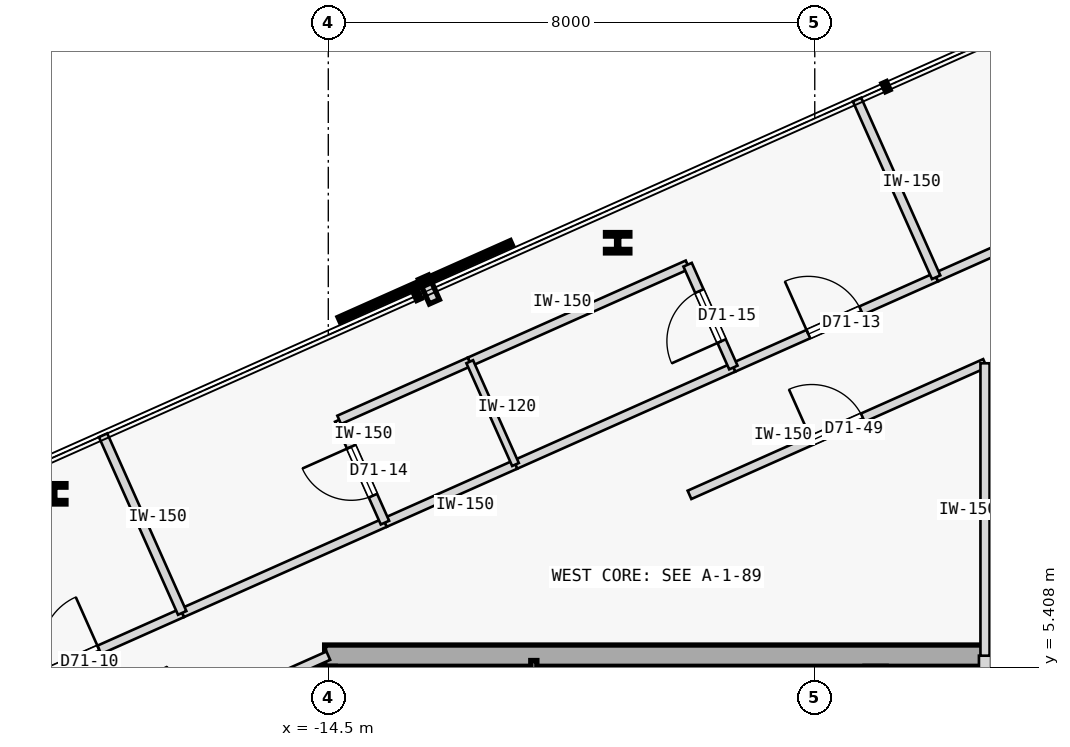
"""IFC4 building model, lengths in metres.
Left out: names, types, materials, properties, quantities, classifications, styles, units other than length and angle.
Written with IfcOpenShell. Run it as: python <this file> out.ifc"""

import sys

from ifc_helpers import new_model, si_unit, direction, frame, frame_2d, origin, origin_2d, place, context, subcontext, project, spatial, rectangle, hollow_rectangle, i_section, extrude, element, fill, save


model = new_model("IFC4")
c1 = context("Model", 3, precision=1e-05, world=origin(), true_north=direction((0.0, 1.0)))
c2 = subcontext(c1, "Body", "Model", "MODEL_VIEW")
j1 = project(units=[si_unit("LENGTHUNIT", "METRE"), si_unit("PLANEANGLEUNIT", "RADIAN")], contexts=[c1])
p1 = place(None, origin())
s1 = spatial("IfcSite", under=j1, at=p1, CompositionType="ELEMENT")
p2 = place(p1, origin())
s2 = spatial("IfcBuilding", under=s1, at=p2, CompositionType="ELEMENT")
p3 = place(p2, frame((0.0, 0.0, 265.55)))
s3 = spatial("IfcBuildingStorey", under=s2, at=p3, CompositionType="ELEMENT", Elevation=265.55)
p4 = place(p3, frame((-14.56, 5.6, 0.0), z_axis=(0.0, 0.0, 1.0), x_axis=(1.0, 0.0, 0.0)))
e1 = element("IfcWall", 1, at=p4, inside=s3, PredefinedType="SHEAR", context=c2, shape_type="SweptSolid", body=[
    extrude(rectangle(XDim=11.41, YDim=0.35, at=frame_2d((5.705, 0.0))), origin(), (0.0, 0.0, 1.0), 3.125),
])
p5 = place(p3, frame((-14.56, -5.425, 0.0), z_axis=(0.0, 0.0, 1.0), x_axis=(0.0, 1.0, 0.0)))
e2 = element("IfcWall", 2, at=p5, inside=s3, PredefinedType="SHEAR", context=c2, shape_type="SweptSolid", body=[
    extrude(rectangle(XDim=10.85, YDim=0.35, at=frame_2d((5.425, 0.0))), origin(), (0.0, 0.0, 1.0), 3.125),
])
p6 = place(p3, frame((-5.5, 2.15, 0.0), z_axis=(0.0, 0.0, 1.0), x_axis=(0.0, 1.0, 0.0)))
e3 = element("IfcWall", 3, at=p6, inside=s3, PredefinedType="SHEAR", context=c2, shape_type="SweptSolid", body=[
    extrude(rectangle(XDim=3.275, YDim=0.35, at=frame_2d((1.638, 0.0))), origin(), (0.0, 0.0, 1.0), 3.125),
])
p7 = place(p3, frame((-11.12, 5.42, 0.0), z_axis=(0.0, 0.0, 1.0), x_axis=(1.0, 0.0, 0.0)))
e4 = element("IfcColumn", 4, at=p7, inside=s3, PredefinedType="COLUMN", context=c2, shape_type="SweptSolid", body=[
    extrude(hollow_rectangle(XDim=0.1, YDim=0.2, WallThickness=0.008, at=origin_2d()), origin(), (0.0, 0.0, 1.0), 3.35),
])
for number, where, z_axis, x_axis in (
    (5, (-9.741, 12.39, 0.0), (0.0, 0.0, 1.0), (1.0, 0.0, 0.0)),
    (6, (-19.015, 8.262, 0.0), (0.0, 0.0, 1.0), (1.0, 0.0, 0.0)),
):
    element("IfcColumn", number, at=place(p3, frame(where, z_axis=z_axis, x_axis=x_axis)), inside=s3, PredefinedType="COLUMN", context=c2, shape_type="SweptSolid", body=[
        extrude(i_section(OverallWidth=0.401, OverallDepth=0.335, WebThickness=0.036, FlangeThickness=0.058, FilletRadius=0.015, at=origin_2d()), origin(), (0.0, 0.0, 1.0), 3.35),
    ])
p8 = place(p3, frame((-3.7, -1.15, 0.0), z_axis=(0.0, 0.0, 1.0), x_axis=(0.0, 1.0, 0.0)))
e7 = element("IfcWall", 7, at=p8, inside=s3, PredefinedType="STANDARD", context=c2, shape_type="SweptSolid", body=[
    extrude(rectangle(XDim=6.75, YDim=0.2, at=frame_2d((3.375, 0.0))), origin(), (0.0, 0.0, 1.0), 3.125),
])
p9 = place(p8, frame((1.1, 0.0, 0.0)))
e8 = element("IfcOpeningElement", 8, at=p9, cuts=e7, PredefinedType="OPENING", context=c2, shape_type="SweptSolid", body=[
    extrude(rectangle(XDim=0.9, YDim=2.15, at=frame_2d((0.45, 1.075))), frame((0.0, 0.11, 0.0), z_axis=(0.0, -1.0, 0.0), x_axis=(1.0, 0.0, 0.0)), (0.0, 0.0, 1.0), 0.22),
])
p10 = place(p8, frame((4.0, 0.0, 0.0)))
e9 = element("IfcOpeningElement", 9, at=p10, cuts=e7, PredefinedType="OPENING", context=c2, shape_type="SweptSolid", body=[
    extrude(rectangle(XDim=0.92, YDim=2.15, at=frame_2d((0.46, 1.075))), frame((0.0, 0.11, 0.0), z_axis=(0.0, -1.0, 0.0), x_axis=(1.0, 0.0, 0.0)), (0.0, 0.0, 1.0), 0.22),
])
p11 = place(p3, frame((-20.499, 4.702, 0.0), z_axis=(0.0, 0.0, 1.0), x_axis=(0.913553019012, 0.406719659537, 0.0)))
e10 = element("IfcWall", 10, at=p11, inside=s3, PredefinedType="PARTITIONING", context=c2, shape_type="SweptSolid", body=[
    extrude(rectangle(XDim=3.936, YDim=0.15, at=frame_2d((1.968, 0.0))), origin(), (0.0, 0.0, 1.0), 3.125),
])
p12 = place(p11, frame((1.493, 0.0, 0.0)))
e11 = element("IfcOpeningElement", 11, at=p12, cuts=e10, PredefinedType="OPENING", context=c2, shape_type="SweptSolid", body=[
    extrude(rectangle(XDim=0.95, YDim=2.15, at=frame_2d((0.475, 1.075))), frame((0.0, 0.085, 0.0), z_axis=(0.0, -1.0, 0.0), x_axis=(1.0, 0.0, 0.0)), (0.0, 0.0, 1.0), 0.17),
])
p13 = place(p3, frame((-16.903, 6.303, 0.0), z_axis=(0.0, 0.0, 1.0), x_axis=(0.913543802, 0.40674036169, 0.0)))
e12 = element("IfcWall", 12, at=p13, inside=s3, PredefinedType="PARTITIONING", context=c2, shape_type="SweptSolid", body=[
    extrude(rectangle(XDim=3.65, YDim=0.15, at=frame_2d((1.825, 0.0))), origin(), (0.0, 0.0, 1.0), 3.125),
])
p14 = place(p3, frame((-7.839, 10.339, 0.0), z_axis=(0.0, 0.0, 1.0), x_axis=(0.913543802, 0.40674036169, 0.0)))
e13 = element("IfcWall", 13, at=p14, inside=s3, PredefinedType="PARTITIONING", context=c2, shape_type="SweptSolid", body=[
    extrude(rectangle(XDim=3.65, YDim=0.15, at=frame_2d((1.825, 0.0))), origin(), (0.0, 0.0, 1.0), 3.125),
])
p15 = place(p14, frame((1.35, 0.0, 0.0)))
e14 = element("IfcOpeningElement", 14, at=p15, cuts=e13, PredefinedType="OPENING", context=c2, shape_type="SweptSolid", body=[
    extrude(rectangle(XDim=0.95, YDim=2.15, at=frame_2d((0.475, 1.075))), frame((0.0, 0.085, 0.0), z_axis=(0.0, -1.0, 0.0), x_axis=(1.0, 0.0, 0.0)), (0.0, 0.0, 1.0), 0.17),
])
p16 = place(p3, frame((-13.568, 7.788, 0.0), z_axis=(0.0, 0.0, 1.0), x_axis=(0.913558622212, 0.406707073682, 0.0)))
e15 = element("IfcWall", 15, at=p16, inside=s3, PredefinedType="PARTITIONING", context=c2, shape_type="SweptSolid", body=[
    extrude(rectangle(XDim=2.35, YDim=0.15, at=frame_2d((1.175, 0.0))), origin(), (0.0, 0.0, 1.0), 3.125),
])
p17 = place(p3, frame((-11.421, 8.744, 0.0), z_axis=(0.0, 0.0, 1.0), x_axis=(0.913539234326, 0.406750620585, 0.0)))
e16 = element("IfcWall", 16, at=p17, inside=s3, PredefinedType="PARTITIONING", context=c2, shape_type="SweptSolid", body=[
    extrude(rectangle(XDim=3.922, YDim=0.15, at=frame_2d((1.961, 0.0))), origin(), (0.0, 0.0, 1.0), 3.125),
])
p18 = place(p3, frame((-4.504, 11.823, 0.0), z_axis=(0.0, 0.0, 1.0), x_axis=(0.913543802, 0.40674036169, 0.0)))
e17 = element("IfcWall", 17, at=p18, inside=s3, PredefinedType="PARTITIONING", context=c2, shape_type="SweptSolid", body=[
    extrude(rectangle(XDim=3.65, YDim=0.15, at=frame_2d((1.825, 0.0))), origin(), (0.0, 0.0, 1.0), 3.125),
])
p19 = place(p18, frame((1.35, 0.0, 0.0)))
e18 = element("IfcOpeningElement", 18, at=p19, cuts=e17, PredefinedType="OPENING", context=c2, shape_type="SweptSolid", body=[
    extrude(rectangle(XDim=0.95, YDim=2.15, at=frame_2d((0.475, 1.075))), frame((0.0, 0.085, 0.0), z_axis=(0.0, -1.0, 0.0), x_axis=(1.0, 0.0, 0.0)), (0.0, 0.0, 1.0), 0.17),
])
p20 = place(p3, frame((-18.661, 3.747, 0.0), z_axis=(0.0, 0.0, 1.0), x_axis=(0.913535055583, 0.40676000568, 0.0)))
e19 = element("IfcWall", 19, at=p20, inside=s3, PredefinedType="PARTITIONING", context=c2, shape_type="SweptSolid", body=[
    extrude(rectangle(XDim=4.555, YDim=0.15, at=frame_2d((2.277, 0.0))), origin(), (0.0, 0.0, 1.0), 3.125),
])
p21 = place(p20, frame((1.134, 0.0, 0.0)))
e20 = element("IfcOpeningElement", 20, at=p21, cuts=e19, PredefinedType="OPENING", context=c2, shape_type="SweptSolid", body=[
    extrude(rectangle(XDim=0.92, YDim=2.15, at=frame_2d((0.46, 1.075))), frame((0.0, 0.085, 0.0), z_axis=(0.0, -1.0, 0.0), x_axis=(1.0, 0.0, 0.0)), (0.0, 0.0, 1.0), 0.17),
])
p22 = place(p3, frame((-8.56, 8.244, 0.0), z_axis=(0.0, 0.0, 1.0), x_axis=(0.91354831274, 0.406730230362, 0.0)))
e21 = element("IfcWall", 21, at=p22, inside=s3, PredefinedType="PARTITIONING", context=c2, shape_type="SweptSolid", body=[
    extrude(rectangle(XDim=5.32, YDim=0.15, at=frame_2d((2.66, 0.0))), origin(), (0.0, 0.0, 1.0), 3.125),
])
p23 = place(p22, frame((2.2, 0.0, 0.0)))
e22 = element("IfcOpeningElement", 22, at=p23, cuts=e21, PredefinedType="OPENING", context=c2, shape_type="SweptSolid", body=[
    extrude(rectangle(XDim=0.92, YDim=2.15, at=frame_2d((0.46, 1.075))), frame((0.0, 0.085, 0.0), z_axis=(0.0, -1.0, 0.0), x_axis=(1.0, 0.0, 0.0)), (0.0, 0.0, 1.0), 0.17),
])
p24 = place(p3, frame((-3.7, 5.6, 0.0), z_axis=(0.0, 0.0, 1.0), x_axis=(5.077173e-05, 0.999999998711, 0.0)))
e23 = element("IfcWall", 23, at=p24, inside=s3, PredefinedType="PARTITIONING", context=c2, shape_type="SweptSolid", body=[
    extrude(rectangle(XDim=4.809, YDim=0.15, at=frame_2d((2.404, 0.0))), origin(), (0.0, 0.0, 1.0), 3.125),
])
p25 = place(p3, frame((-16.903, 6.303, 0.0), z_axis=(0.0, 0.0, 1.0), x_axis=(-0.406733350739, 0.913546923478, 0.0)))
e24 = element("IfcWall", 24, at=p25, inside=s3, PredefinedType="PARTITIONING", context=c2, shape_type="SweptSolid", body=[
    extrude(rectangle(XDim=3.198, YDim=0.15, at=frame_2d((1.599, 0.0))), origin(), (0.0, 0.0, 1.0), 3.125),
])
p26 = place(p3, frame((-13.568, 7.788, 0.0), z_axis=(0.0, 0.0, 1.0), x_axis=(-0.406750635596, 0.913539227643, 0.0)))
e25 = element("IfcWall", 25, at=p26, inside=s3, PredefinedType="PARTITIONING", context=c2, shape_type="SweptSolid", body=[
    extrude(rectangle(XDim=1.85, YDim=0.15, at=frame_2d((0.925, 0.0))), origin(), (0.0, 0.0, 1.0), 3.125),
])
p27 = place(p26, frame((0.485, 0.0, 0.0)))
e26 = element("IfcOpeningElement", 26, at=p27, cuts=e25, PredefinedType="OPENING", context=c2, shape_type="SweptSolid", body=[
    extrude(rectangle(XDim=0.88, YDim=2.15, at=frame_2d((0.44, 1.075))), frame((0.0, 0.085, 0.0), z_axis=(0.0, -1.0, 0.0), x_axis=(1.0, 0.0, 0.0)), (0.0, 0.0, 1.0), 0.17),
])
p28 = place(p3, frame((-14.321, 9.478, 0.0), z_axis=(0.0, 0.0, 1.0), x_axis=(0.913502828817, 0.406832375486, 0.0)))
e27 = element("IfcWall", 27, at=p28, inside=s3, PredefinedType="PARTITIONING", context=c2, shape_type="SweptSolid", body=[
    extrude(rectangle(XDim=2.35, YDim=0.15, at=frame_2d((1.175, 0.0))), origin(), (0.0, 0.0, 1.0), 3.125),
])
p29 = place(p3, frame((-12.174, 10.434, 0.0), z_axis=(0.0, 0.0, 1.0), x_axis=(0.913549532696, 0.406727490232, 0.0)))
e28 = element("IfcWall", 28, at=p29, inside=s3, PredefinedType="PARTITIONING", context=c2, shape_type="SweptSolid", body=[
    extrude(rectangle(XDim=3.922, YDim=0.15, at=frame_2d((1.961, 0.0))), origin(), (0.0, 0.0, 1.0), 3.125),
])
p30 = place(p3, frame((-7.839, 10.339, 0.0), z_axis=(0.0, 0.0, 1.0), x_axis=(-0.406701600856, 0.913561058639, 0.0)))
e29 = element("IfcWall", 29, at=p30, inside=s3, PredefinedType="PARTITIONING", context=c2, shape_type="SweptSolid", body=[
    extrude(rectangle(XDim=1.85, YDim=0.15, at=frame_2d((0.925, 0.0))), origin(), (0.0, 0.0, 1.0), 3.125),
])
p31 = place(p30, frame((0.475, 0.0, 0.0)))
e30 = element("IfcOpeningElement", 30, at=p31, cuts=e29, PredefinedType="OPENING", context=c2, shape_type="SweptSolid", body=[
    extrude(rectangle(XDim=0.9, YDim=2.15, at=frame_2d((0.45, 1.075))), frame((0.0, 0.085, 0.0), z_axis=(0.0, -1.0, 0.0), x_axis=(1.0, 0.0, 0.0)), (0.0, 0.0, 1.0), 0.17),
])
p32 = place(p3, frame((-4.504, 11.823, 0.0), z_axis=(0.0, 0.0, 1.0), x_axis=(-0.406733350739, 0.913546923478, 0.0)))
e31 = element("IfcWall", 31, at=p32, inside=s3, PredefinedType="PARTITIONING", context=c2, shape_type="SweptSolid", body=[
    extrude(rectangle(XDim=3.198, YDim=0.15, at=frame_2d((1.599, 0.0))), origin(), (0.0, 0.0, 1.0), 3.125),
])
p33 = place(p3, frame((-11.421, 8.744, 0.0), z_axis=(0.0, 0.0, 1.0), x_axis=(-0.406811725227, 0.913512025218, 0.0)))
e32 = element("IfcWall", 32, at=p33, inside=s3, PredefinedType="PARTITIONING", context=c2, shape_type="SweptSolid", body=[
    extrude(rectangle(XDim=1.85, YDim=0.12, at=frame_2d((0.925, 0.0))), origin(), (0.0, 0.0, 1.0), 3.125),
])
p34 = place(p12, origin())
e33 = element("IfcDoor", 33, at=p34, inside=s3, OperationType="SINGLE_SWING_RIGHT", PredefinedType="DOOR", context=c2, shape_type="SweptSolid", body=[
    extrude(rectangle(XDim=0.95, YDim=2.15, at=frame_2d((0.475, 1.075))), frame((0.0, 0.025, 0.0), z_axis=(0.0, -1.0, 0.0), x_axis=(1.0, 0.0, 0.0)), (0.0, 0.0, 1.0), 0.05),
])
fill(e11, e33)
p35 = place(p15, origin())
e34 = element("IfcDoor", 34, at=p35, inside=s3, OperationType="SINGLE_SWING_LEFT", PredefinedType="DOOR", context=c2, shape_type="SweptSolid", body=[
    extrude(rectangle(XDim=0.95, YDim=2.15, at=frame_2d((0.475, 1.075))), frame((0.0, 0.025, 0.0), z_axis=(0.0, -1.0, 0.0), x_axis=(1.0, 0.0, 0.0)), (0.0, 0.0, 1.0), 0.05),
])
fill(e14, e34)
p36 = place(p27, origin())
e35 = element("IfcDoor", 35, at=p36, inside=s3, OperationType="SINGLE_SWING_RIGHT", PredefinedType="DOOR", context=c2, shape_type="SweptSolid", body=[
    extrude(rectangle(XDim=0.88, YDim=2.15, at=frame_2d((0.44, 1.075))), frame((0.0, 0.025, 0.0), z_axis=(0.0, -1.0, 0.0), x_axis=(1.0, 0.0, 0.0)), (0.0, 0.0, 1.0), 0.05),
])
fill(e26, e35)
p37 = place(p31, origin())
e36 = element("IfcDoor", 36, at=p37, inside=s3, OperationType="SINGLE_SWING_LEFT", PredefinedType="DOOR", context=c2, shape_type="SweptSolid", body=[
    extrude(rectangle(XDim=0.9, YDim=2.15, at=frame_2d((0.45, 1.075))), frame((0.0, 0.025, 0.0), z_axis=(0.0, -1.0, 0.0), x_axis=(1.0, 0.0, 0.0)), (0.0, 0.0, 1.0), 0.05),
])
fill(e30, e36)
p38 = place(p23, origin())
e37 = element("IfcDoor", 37, at=p38, inside=s3, OperationType="SINGLE_SWING_LEFT", PredefinedType="DOOR", context=c2, shape_type="SweptSolid", body=[
    extrude(rectangle(XDim=0.92, YDim=2.15, at=frame_2d((0.46, 1.075))), frame((0.0, 0.025, 0.0), z_axis=(0.0, -1.0, 0.0), x_axis=(1.0, 0.0, 0.0)), (0.0, 0.0, 1.0), 0.05),
])
fill(e22, e37)
save(model, sys.argv[1])
